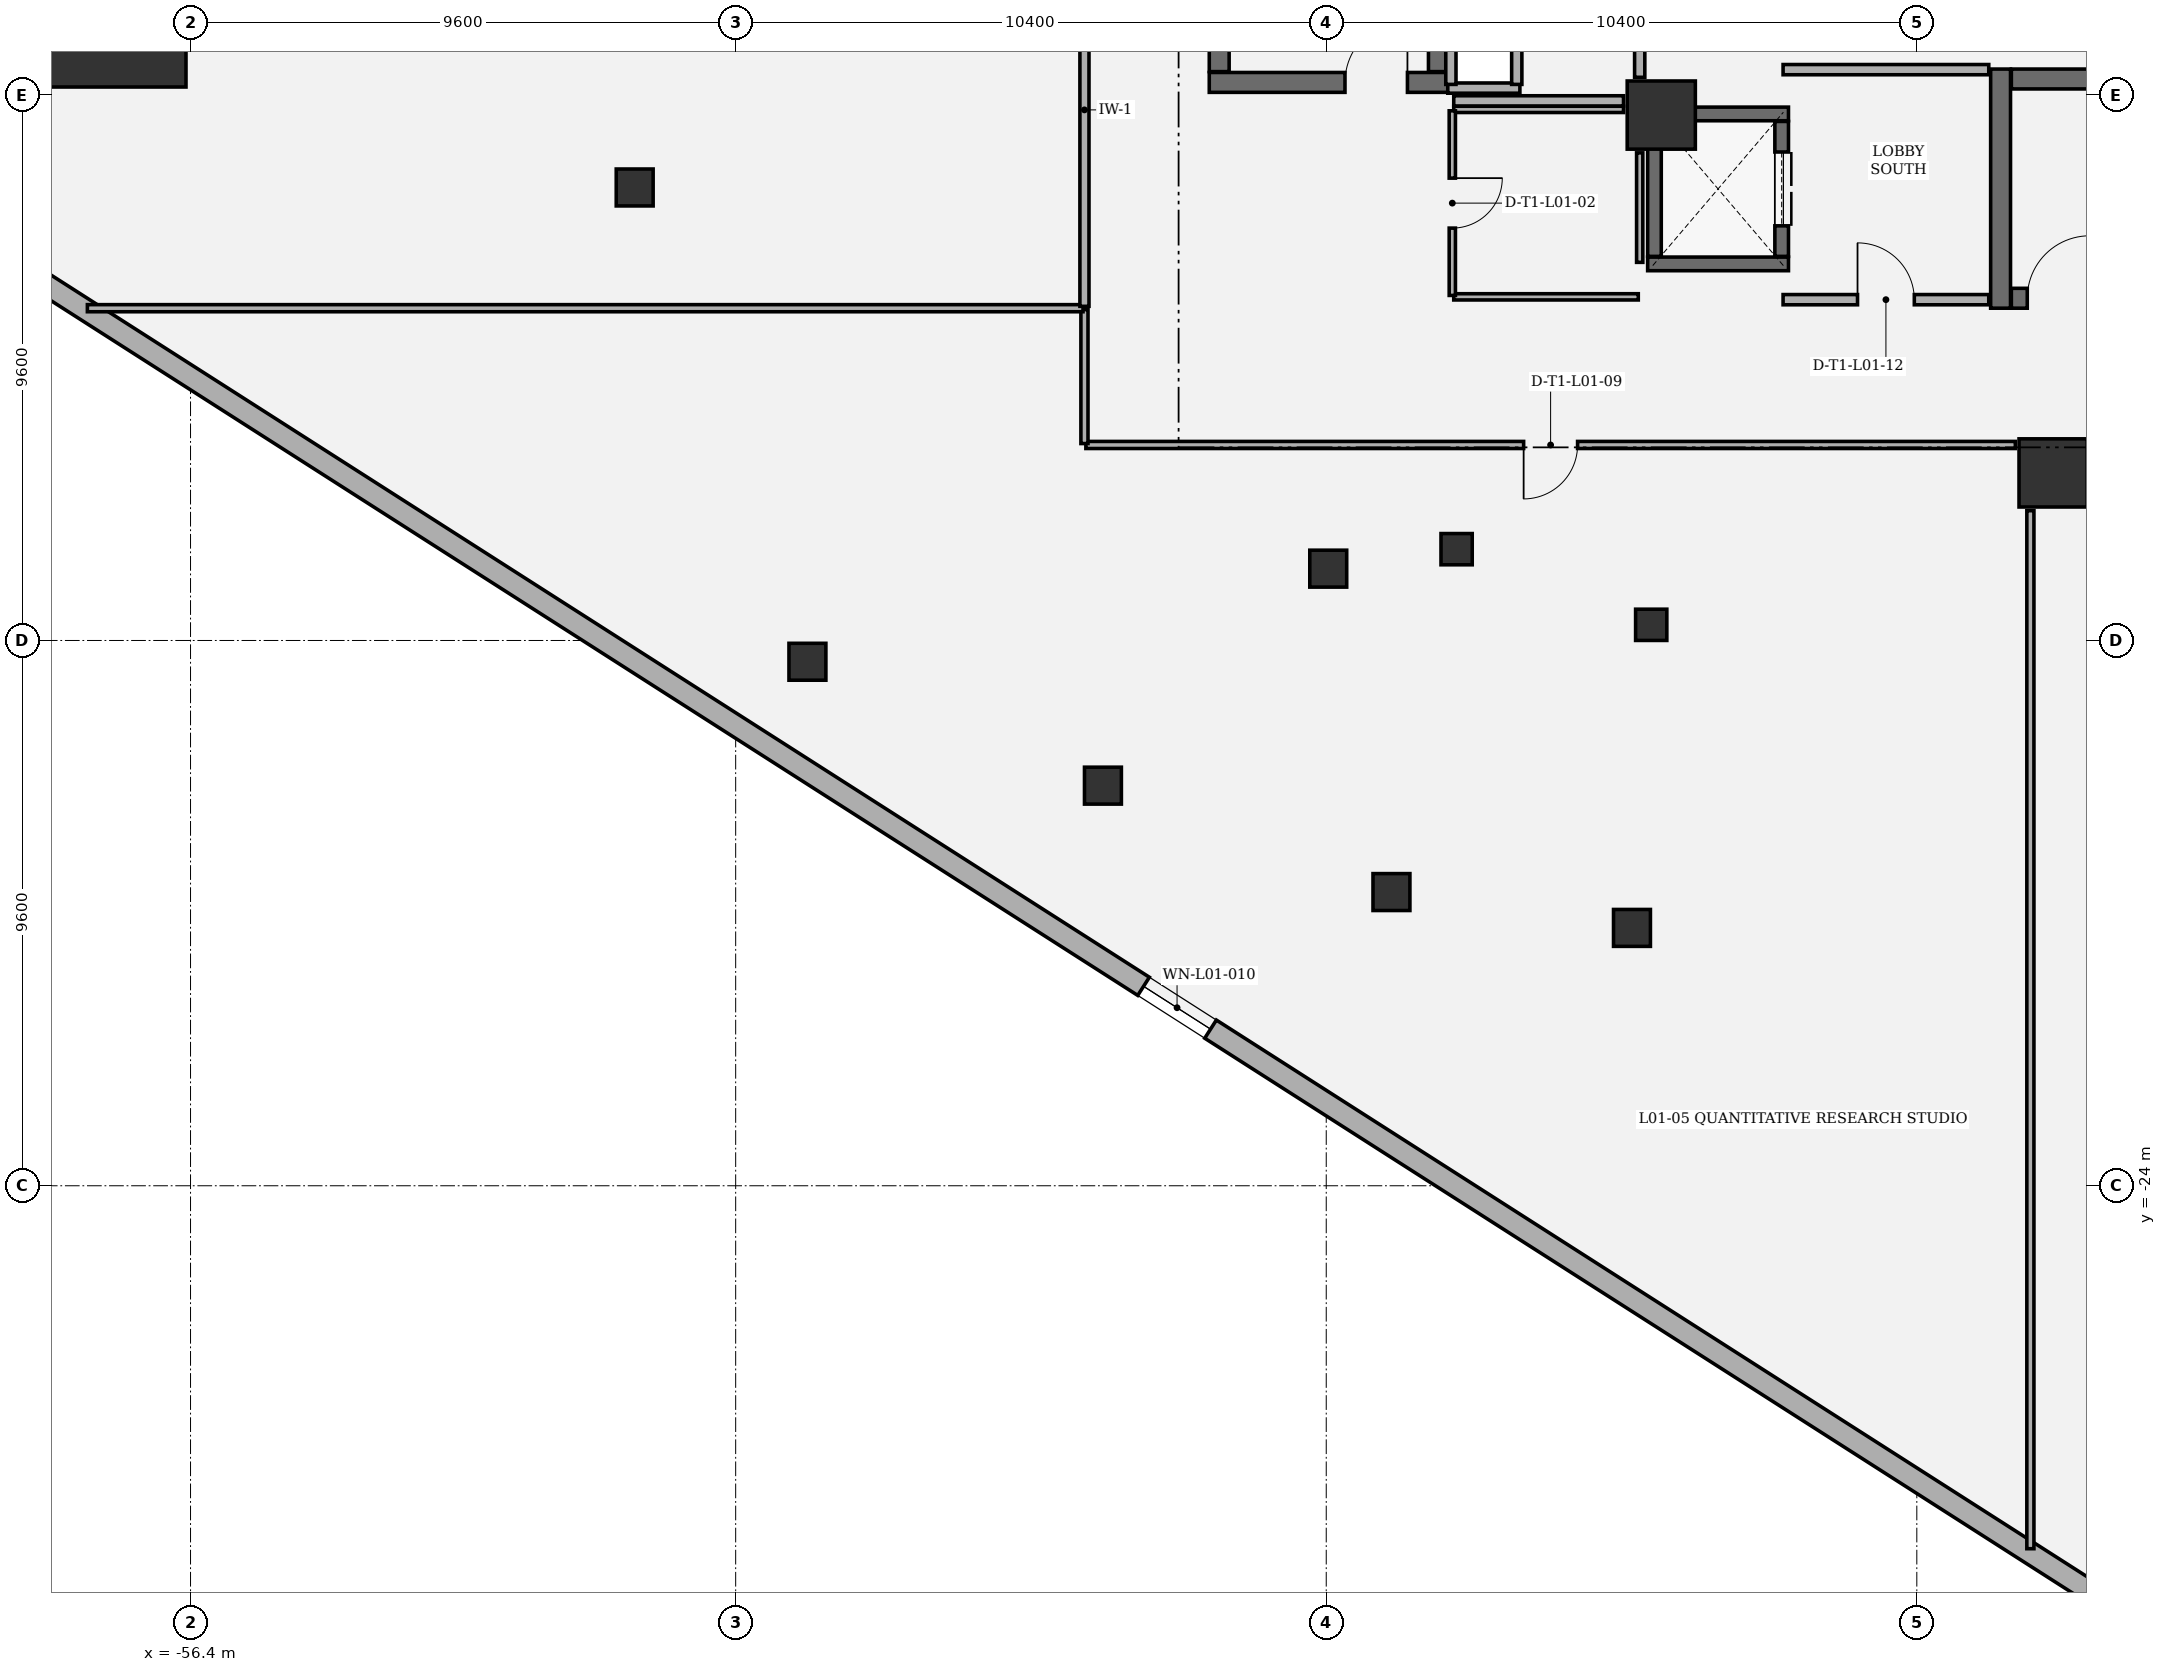
"""IFC4 building model, lengths in metres.
Left out: names, types, materials, properties, quantities, classifications, styles, units other than length and angle.
Written with IfcOpenShell. Run it as: python <this file> out.ifc"""

import sys

from ifc_helpers import new_model, si_unit, direction, frame, frame_2d, origin, origin_2d, place, context, subcontext, project, spatial, rectangle, extrude, element, fill, save


model = new_model("IFC4")
c1 = context("Model", 3, precision=1e-05, world=origin(), true_north=direction((0.0, 1.0)))
c2 = subcontext(c1, "Body", "Model", "MODEL_VIEW")
j1 = project(units=[si_unit("LENGTHUNIT", "METRE"), si_unit("PLANEANGLEUNIT", "RADIAN")], contexts=[c1])
p1 = place(None, origin())
s1 = spatial("IfcSite", under=j1, at=p1, CompositionType="ELEMENT")
p2 = place(p1, origin())
s2 = spatial("IfcBuilding", under=s1, at=p2, CompositionType="ELEMENT")
p3 = place(p2, frame((0.0, 0.0, 6.6)))
s3 = spatial("IfcBuildingStorey", under=s2, at=p3, CompositionType="ELEMENT", Elevation=6.6)
p4 = place(p3, frame((-57.68, -3.456, 0.0), z_axis=(0.0, 0.0, 1.0), x_axis=(1.0, 0.0, 0.0)))
e1 = element("IfcColumn", 1, at=p4, inside=s3, PredefinedType="COLUMN", context=c2, shape_type="SweptSolid", body=[
    extrude(rectangle(XDim=2.4, YDim=2.4, at=origin_2d()), origin(), (0.0, 0.0, 1.0), 5.4),
])
for number, where, z_axis, x_axis in (
    (2, (-23.6, -11.45, 0.0), (0.0, 0.0, 1.0), (1.0, 0.0, 0.0)),
    (3, (-30.5, -5.15, 0.0), (0.0, 0.0, 1.0), (1.0, 0.0, 0.0)),
):
    element("IfcColumn", number, at=place(p3, frame(where, z_axis=z_axis, x_axis=x_axis)), inside=s3, PredefinedType="COLUMN", context=c2, shape_type="SweptSolid", body=[
        extrude(rectangle(XDim=1.2, YDim=1.2, at=origin_2d()), origin(), (0.0, 0.0, 1.0), 5.4),
    ])
for number, where, z_axis, x_axis in (
    (4, (-45.536, -14.775, 0.0), (0.0, 0.0, 1.0), (1.0, 0.0, 0.0)),
    (5, (-40.333, -16.956, 0.0), (0.0, 0.0, 1.0), (1.0, 0.0, 0.0)),
    (6, (-35.252, -18.829, 0.0), (0.0, 0.0, 1.0), (1.0, 0.0, 0.0)),
    (7, (-31.016, -19.46, 0.0), (0.0, 0.0, 1.0), (1.0, 0.0, 0.0)),
    (8, (-48.578, -6.425, 0.0), (0.0, 0.0, 1.0), (1.0, 0.0, 0.0)),
    (9, (-36.365, -13.135, 0.0), (0.0, 0.0, 1.0), (1.0, 0.0, 0.0)),
):
    element("IfcColumn", number, at=place(p3, frame(where, z_axis=z_axis, x_axis=x_axis)), inside=s3, PredefinedType="COLUMN", context=c2, shape_type="SweptSolid", body=[
        extrude(rectangle(XDim=0.65, YDim=0.65, at=origin_2d()), origin(), (0.0, 0.0, 1.0), 5.4),
    ])
for number, where, z_axis, x_axis in (
    (10, (-34.104, -12.792, 0.0), (0.0, 0.0, 1.0), (1.0, 0.0, 0.0)),
    (11, (-30.677, -14.124, 0.0), (0.0, 0.0, 1.0), (1.0, 0.0, 0.0)),
):
    element("IfcColumn", number, at=place(p3, frame(where, z_axis=z_axis, x_axis=x_axis)), inside=s3, PredefinedType="COLUMN", context=c2, shape_type="SweptSolid", body=[
        extrude(rectangle(XDim=0.55, YDim=0.55, at=origin_2d()), origin(), (0.0, 0.0, 1.0), 5.4),
    ])
p5 = place(p3, frame((-13.635, -37.094, 0.0), z_axis=(0.0, 0.0, 1.0), x_axis=(-0.842602364841, 0.538536214905, 0.0)))
e12 = element("IfcWall", 12, at=p5, inside=s3, PredefinedType="SOLIDWALL", context=c2, shape_type="SweptSolid", body=[
    extrude(rectangle(XDim=60.27, YDim=0.38, at=frame_2d((30.135, 0.0))), origin(), (0.0, 0.0, 1.0), 5.14),
])
p6 = place(p5, frame((29.435, 0.0, 0.8)))
e13 = element("IfcOpeningElement", 13, at=p6, cuts=e12, PredefinedType="OPENING", context=c2, shape_type="SweptSolid", body=[
    extrude(rectangle(XDim=1.4, YDim=1.5, at=frame_2d((0.7, 0.75))), frame((0.0, 0.2, 0.0), z_axis=(0.0, -1.0, 0.0), x_axis=(1.0, 0.0, 0.0)), (0.0, 0.0, 1.0), 0.4),
])
p7 = place(p3, frame((-24.525, -4.34, 0.0), z_axis=(0.0, 0.0, 1.0), x_axis=(0.0, -1.0, 0.0)))
e14 = element("IfcWall", 14, at=p7, inside=s3, PredefinedType="SHEAR", context=c2, shape_type="SweptSolid", body=[
    extrude(rectangle(XDim=4.21, YDim=0.35, at=frame_2d((2.105, 0.0))), origin(), (0.0, 0.0, 1.0), 5.14),
])
p8 = place(p3, frame((-24.335, -8.375, 0.0), z_axis=(0.0, 0.0, 1.0), x_axis=(1.0, 0.0, 0.0)))
e15 = element("IfcWall", 15, at=p8, inside=s3, PredefinedType="SHEAR", context=c2, shape_type="SweptSolid", body=[
    extrude(rectangle(XDim=8.12, YDim=0.35, at=frame_2d((4.06, 0.0))), origin(), (0.0, 0.0, 1.0), 5.14),
])
p9 = place(p8, frame((0.28, 0.0, 0.0)))
e16 = element("IfcOpeningElement", 16, at=p9, cuts=e15, PredefinedType="OPENING", context=c2, shape_type="SweptSolid", body=[
    extrude(rectangle(XDim=1.1, YDim=2.2, at=frame_2d((0.55, 1.1))), frame((0.0, 0.185, 0.0), z_axis=(0.0, -1.0, 0.0), x_axis=(1.0, 0.0, 0.0)), (0.0, 0.0, 1.0), 0.37),
])
p10 = place(p3, frame((-16.215, -4.515, 0.0), z_axis=(0.0, 0.0, 1.0), x_axis=(-1.0, 0.0, 0.0)))
e17 = element("IfcWall", 17, at=p10, inside=s3, PredefinedType="SHEAR", context=c2, shape_type="SweptSolid", body=[
    extrude(rectangle(XDim=8.12, YDim=0.35, at=frame_2d((4.06, 0.0))), origin(), (0.0, 0.0, 1.0), 5.14),
])
p11 = place(p3, frame((-38.46, -4.575, 0.0), z_axis=(0.0, 0.0, 1.0), x_axis=(1.0, 0.0, 0.0)))
e18 = element("IfcWall", 18, at=p11, inside=s3, PredefinedType="SHEAR", context=c2, shape_type="SweptSolid", body=[
    extrude(rectangle(XDim=4.21, YDim=0.35, at=frame_2d((2.105, 0.0))), origin(), (0.0, 0.0, 1.0), 5.14),
])
p12 = place(p11, frame((2.39, 0.0, 0.0)))
e19 = element("IfcOpeningElement", 19, at=p12, cuts=e18, PredefinedType="OPENING", context=c2, shape_type="SweptSolid", body=[
    extrude(rectangle(XDim=1.1, YDim=2.2, at=frame_2d((0.55, 1.1))), frame((0.0, 0.185, 0.0), z_axis=(0.0, -1.0, 0.0), x_axis=(1.0, 0.0, 0.0)), (0.0, 0.0, 1.0), 0.37),
])
for number, where, z_axis, x_axis in (
    (20, (-34.425, -4.385, 0.0), (0.0, 0.0, 1.0), (0.0, 1.0, 0.0)),
    (21, (-38.285, 4.385, 0.0), (0.0, 0.0, 1.0), (0.0, -1.0, 0.0)),
):
    element("IfcWall", number, at=place(p3, frame(where, z_axis=z_axis, x_axis=x_axis)), inside=s3, PredefinedType="SHEAR", context=c2, shape_type="SweptSolid", body=[
        extrude(rectangle(XDim=8.77, YDim=0.35, at=frame_2d((4.385, 0.0))), origin(), (0.0, 0.0, 1.0), 5.14),
    ])
for number, where, z_axis, x_axis in (
    (22, (-28.26, -7.77, 0.0), (0.0, 0.0, 1.0), (-1.0, 0.0, 0.0)),
    (23, (-30.74, -5.13, 0.0), (0.0, 0.0, 1.0), (1.0, 0.0, 0.0)),
):
    element("IfcWall", number, at=place(p3, frame(where, z_axis=z_axis, x_axis=x_axis)), inside=s3, PredefinedType="SHEAR", context=c2, shape_type="SweptSolid", body=[
        extrude(rectangle(XDim=2.48, YDim=0.24, at=frame_2d((1.24, 0.0))), origin(), (0.0, 0.0, 1.0), 5.14),
    ])
p13 = place(p3, frame((-30.62, -7.638, 0.0), z_axis=(0.0, 0.0, 1.0), x_axis=(0.0, 1.0, 0.0)))
e24 = element("IfcWall", 24, at=p13, inside=s3, PredefinedType="SHEAR", context=c2, shape_type="SweptSolid", body=[
    extrude(rectangle(XDim=2.376, YDim=0.24, at=frame_2d((1.188, 0.0))), origin(), (0.0, 0.0, 1.0), 5.14),
])
p14 = place(p3, frame((-28.38, -5.262, 0.0), z_axis=(0.0, 0.0, 1.0), x_axis=(0.0, -1.0, 0.0)))
e25 = element("IfcWall", 25, at=p14, inside=s3, PredefinedType="SHEAR", context=c2, shape_type="SweptSolid", body=[
    extrude(rectangle(XDim=2.376, YDim=0.24, at=frame_2d((1.188, 0.0))), origin(), (0.0, 0.0, 1.0), 5.14),
])
p15 = place(p14, frame((0.538, 0.0, 0.0)))
e26 = element("IfcOpeningElement", 26, at=p15, cuts=e25, PredefinedType="OPENING", context=c2, shape_type="SweptSolid", body=[
    extrude(rectangle(XDim=1.3, YDim=2.3, at=frame_2d((0.65, 1.15))), frame((0.0, 0.13, 0.0), z_axis=(0.0, -1.0, 0.0), x_axis=(1.0, 0.0, 0.0)), (0.0, 0.0, 1.0), 0.26),
])
p16 = place(p3, frame((-32.99, -4.675, 0.0), z_axis=(0.0, 0.0, 1.0), x_axis=(-1.0, 0.0, 0.0)))
e27 = element("IfcWall", 27, at=p16, inside=s3, PredefinedType="PARTITIONING", context=c2, shape_type="SweptSolid", body=[
    extrude(rectangle(XDim=1.27, YDim=0.18, at=frame_2d((0.635, 0.0))), origin(), (0.0, 0.0, 1.0), 5.14),
])
for number, where, z_axis, x_axis in (
    (28, (-34.205, -4.61, 0.0), (0.0, 0.0, 1.0), (0.0, 1.0, 0.0)),
    (29, (-33.045, -3.66, 0.0), (0.0, 0.0, 1.0), (0.0, -1.0, 0.0)),
):
    element("IfcWall", number, at=place(p3, frame(where, z_axis=z_axis, x_axis=x_axis)), inside=s3, PredefinedType="PARTITIONING", context=c2, shape_type="SweptSolid", body=[
        extrude(rectangle(XDim=0.95, YDim=0.18, at=frame_2d((0.475, 0.0))), origin(), (0.0, 0.0, 1.0), 5.14),
    ])
p17 = place(p3, frame((-28.355, -8.4, 0.0), z_axis=(0.0, 0.0, 1.0), x_axis=(1.0, 0.0, 0.0)))
e30 = element("IfcWall", 30, at=p17, inside=s3, PredefinedType="PARTITIONING", context=c2, shape_type="SweptSolid", body=[
    extrude(rectangle(XDim=3.622, YDim=0.18, at=frame_2d((1.811, 0.0))), origin(), (0.0, 0.0, 1.0), 5.14),
])
p18 = place(p17, frame((1.311, 0.0, 0.0)))
e31 = element("IfcOpeningElement", 31, at=p18, cuts=e30, PredefinedType="OPENING", context=c2, shape_type="SweptSolid", body=[
    extrude(rectangle(XDim=1.0, YDim=2.15, at=frame_2d((0.5, 1.075))), frame((0.0, 0.1, 0.0), z_axis=(0.0, -1.0, 0.0), x_axis=(1.0, 0.0, 0.0)), (0.0, 0.0, 1.0), 0.2),
])
p19 = place(p3, frame((-24.733, -4.35, 0.0), z_axis=(0.0, 0.0, 1.0), x_axis=(-1.0, 0.0, 0.0)))
e32 = element("IfcWall", 32, at=p19, inside=s3, PredefinedType="PARTITIONING", context=c2, shape_type="SweptSolid", body=[
    extrude(rectangle(XDim=3.622, YDim=0.18, at=frame_2d((1.811, 0.0))), origin(), (0.0, 0.0, 1.0), 5.14),
])
p20 = place(p3, frame((-34.155, -8.35, 0.0), z_axis=(0.0, 0.0, 1.0), x_axis=(1.0, 0.0, 0.0)))
e33 = element("IfcWall", 33, at=p20, inside=s3, PredefinedType="PARTITIONING", context=c2, shape_type="SweptSolid", body=[
    extrude(rectangle(XDim=3.25, YDim=0.11, at=frame_2d((1.625, 0.0))), origin(), (0.0, 0.0, 1.0), 5.14),
])
p21 = place(p3, frame((-30.88, -7.743, 0.0), z_axis=(0.0, 0.0, 1.0), x_axis=(0.0, 1.0, 0.0)))
e34 = element("IfcWall", 34, at=p21, inside=s3, PredefinedType="PARTITIONING", context=c2, shape_type="SweptSolid", body=[
    extrude(rectangle(XDim=1.928, YDim=0.11, at=frame_2d((0.964, 0.0))), origin(), (0.0, 0.0, 1.0), 5.14),
])
p22 = place(p3, frame((-31.165, -5.05, 0.0), z_axis=(0.0, 0.0, 1.0), x_axis=(-1.0, 0.0, 0.0)))
e35 = element("IfcWall", 35, at=p22, inside=s3, PredefinedType="PARTITIONING", context=c2, shape_type="SweptSolid", body=[
    extrude(rectangle(XDim=2.99, YDim=0.11, at=frame_2d((1.495, 0.0))), origin(), (0.0, 0.0, 1.0), 5.14),
])
p23 = place(p3, frame((-34.18, -5.075, 0.0), z_axis=(0.0, 0.0, 1.0), x_axis=(0.0, -1.0, 0.0)))
e36 = element("IfcWall", 36, at=p23, inside=s3, PredefinedType="PARTITIONING", context=c2, shape_type="SweptSolid", body=[
    extrude(rectangle(XDim=3.25, YDim=0.11, at=frame_2d((1.625, 0.0))), origin(), (0.0, 0.0, 1.0), 5.14),
])
p24 = place(p23, frame((1.185, 0.0, 0.0)))
e37 = element("IfcOpeningElement", 37, at=p24, cuts=e36, PredefinedType="OPENING", context=c2, shape_type="SweptSolid", body=[
    extrude(rectangle(XDim=0.88, YDim=2.1, at=frame_2d((0.44, 1.05))), frame((0.0, 0.065, 0.0), z_axis=(0.0, -1.0, 0.0), x_axis=(1.0, 0.0, 0.0)), (0.0, 0.0, 1.0), 0.13),
])
p25 = place(p3, frame((-34.155, -4.9, 0.0), z_axis=(0.0, 0.0, 1.0), x_axis=(1.0, 0.0, 0.0)))
e38 = element("IfcWall", 38, at=p25, inside=s3, PredefinedType="PARTITIONING", context=c2, shape_type="SweptSolid", body=[
    extrude(rectangle(XDim=2.99, YDim=0.18, at=frame_2d((1.495, 0.0))), origin(), (0.0, 0.0, 1.0), 5.14),
])
p26 = place(p3, frame((-30.88, -4.485, 0.0), z_axis=(0.0, 0.0, 1.0), x_axis=(0.0, 1.0, 0.0)))
e39 = element("IfcWall", 39, at=p26, inside=s3, PredefinedType="PARTITIONING", context=c2, shape_type="SweptSolid", body=[
    extrude(rectangle(XDim=2.86, YDim=0.18, at=frame_2d((1.43, 0.0))), origin(), (0.0, 0.0, 1.0), 5.14),
])
p27 = place(p3, frame((-24.0, -12.115, 0.0), z_axis=(0.0, 0.0, 1.0), x_axis=(0.0, -1.0, 0.0)))
e40 = element("IfcWall", 40, at=p27, inside=s3, PredefinedType="PARTITIONING", context=c2, shape_type="SweptSolid", body=[
    extrude(rectangle(XDim=18.275, YDim=0.125, at=frame_2d((9.137, 0.0))), origin(), (0.0, 0.0, 1.0), 4.653),
])
p28 = place(p3, frame((-24.265, -10.958, 0.0), z_axis=(0.0, 0.0, 1.0), x_axis=(-1.0, 0.0, 0.0)))
e41 = element("IfcWall", 41, at=p28, inside=s3, PredefinedType="PARTITIONING", context=c2, shape_type="SweptSolid", body=[
    extrude(rectangle(XDim=16.368, YDim=0.125, at=frame_2d((8.184, 0.0))), origin(), (0.0, 0.0, 1.0), 4.653),
])
p29 = place(p28, frame((7.709, 0.0, 0.0)))
e42 = element("IfcOpeningElement", 42, at=p29, cuts=e41, PredefinedType="OPENING", context=c2, shape_type="SweptSolid", body=[
    extrude(rectangle(XDim=0.95, YDim=2.15, at=frame_2d((0.475, 1.075))), frame((0.0, 0.073, 0.0), z_axis=(0.0, -1.0, 0.0), x_axis=(1.0, 0.0, 0.0)), (0.0, 0.0, 1.0), 0.145),
])
p30 = place(p3, frame((-40.658, -8.575, 0.0), z_axis=(0.0, 0.0, 1.0), x_axis=(0.0, -1.0, 0.0)))
e43 = element("IfcWall", 43, at=p30, inside=s3, PredefinedType="PARTITIONING", context=c2, shape_type="SweptSolid", body=[
    extrude(rectangle(XDim=2.358, YDim=0.125, at=frame_2d((1.179, 0.0))), origin(), (0.0, 0.0, 1.0), 5.14),
])
p31 = place(p3, frame((-40.683, -8.55, 0.0), z_axis=(0.0, 0.0, 1.0), x_axis=(-1.0, 0.0, 0.0)))
e44 = element("IfcWall", 44, at=p31, inside=s3, PredefinedType="PARTITIONING", context=c2, shape_type="SweptSolid", body=[
    extrude(rectangle(XDim=17.533, YDim=0.125, at=frame_2d((8.767, 0.0))), origin(), (0.0, 0.0, 1.0), 4.11),
])
p32 = place(p3, frame((-40.658, -8.517, 0.0), z_axis=(0.0, 0.0, 1.0), x_axis=(0.0, 1.0, 0.0)))
e45 = element("IfcWall", 45, at=p32, inside=s3, PredefinedType="PARTITIONING", context=c2, shape_type="SweptSolid", body=[
    extrude(rectangle(XDim=16.804, YDim=0.16, at=frame_2d((8.402, 0.0))), origin(), (0.0, 0.0, 1.0), 5.14),
])
p33 = place(p32, frame((7.852, 0.0, 0.0)))
e46 = element("IfcOpeningElement", 46, at=p33, cuts=e45, PredefinedType="OPENING", context=c2, shape_type="SweptSolid", body=[
    extrude(rectangle(XDim=1.1, YDim=2.15, at=frame_2d((0.55, 1.075))), frame((0.0, 0.09, 0.0), z_axis=(0.0, -1.0, 0.0), x_axis=(1.0, 0.0, 0.0)), (0.0, 0.0, 1.0), 0.18),
])
p34 = place(p6, origin())
e47 = element("IfcWindow", 47, at=p34, inside=s3, PartitioningType="SINGLE_PANEL", PredefinedType="WINDOW", context=c2, shape_type="SweptSolid", body=[
    extrude(rectangle(XDim=1.4, YDim=1.5, at=frame_2d((0.7, 0.75))), frame((0.0, 0.03, 0.0), z_axis=(0.0, -1.0, 0.0), x_axis=(1.0, 0.0, 0.0)), (0.0, 0.0, 1.0), 0.06),
])
fill(e13, e47)
p35 = place(p9, origin())
e48 = element("IfcDoor", 48, at=p35, inside=s3, OperationType="SINGLE_SWING_RIGHT", PredefinedType="DOOR", context=c2, shape_type="SweptSolid", body=[
    extrude(rectangle(XDim=1.1, YDim=2.2, at=frame_2d((0.55, 1.1))), frame((0.0, 0.025, 0.0), z_axis=(0.0, -1.0, 0.0), x_axis=(1.0, 0.0, 0.0)), (0.0, 0.0, 1.0), 0.05),
])
fill(e16, e48)
p36 = place(p12, origin())
e49 = element("IfcDoor", 49, at=p36, inside=s3, OperationType="SINGLE_SWING_RIGHT", PredefinedType="DOOR", context=c2, shape_type="SweptSolid", body=[
    extrude(rectangle(XDim=1.1, YDim=2.2, at=frame_2d((0.55, 1.1))), frame((0.0, 0.025, 0.0), z_axis=(0.0, -1.0, 0.0), x_axis=(1.0, 0.0, 0.0)), (0.0, 0.0, 1.0), 0.05),
])
fill(e19, e49)
p37 = place(p15, origin())
e50 = element("IfcDoor", 50, at=p37, inside=s3, OperationType="DOUBLE_DOOR_SLIDING", PredefinedType="DOOR", context=c2, shape_type="SweptSolid", body=[
    extrude(rectangle(XDim=1.3, YDim=2.3, at=frame_2d((0.65, 1.15))), frame((0.0, 0.025, 0.0), z_axis=(0.0, -1.0, 0.0), x_axis=(1.0, 0.0, 0.0)), (0.0, 0.0, 1.0), 0.05),
])
fill(e26, e50)
p38 = place(p24, origin())
e51 = element("IfcDoor", 51, at=p38, inside=s3, OperationType="SINGLE_SWING_LEFT", PredefinedType="DOOR", context=c2, shape_type="SweptSolid", body=[
    extrude(rectangle(XDim=0.88, YDim=2.1, at=frame_2d((0.44, 1.05))), frame((0.0, 0.025, 0.0), z_axis=(0.0, -1.0, 0.0), x_axis=(1.0, 0.0, 0.0)), (0.0, 0.0, 1.0), 0.05),
])
fill(e37, e51)
p39 = place(p29, origin())
e52 = element("IfcDoor", 52, at=p39, inside=s3, OperationType="SINGLE_SWING_RIGHT", PredefinedType="DOOR", context=c2, shape_type="SweptSolid", body=[
    extrude(rectangle(XDim=0.95, YDim=2.15, at=frame_2d((0.475, 1.075))), frame((0.0, 0.025, 0.0), z_axis=(0.0, -1.0, 0.0), x_axis=(1.0, 0.0, 0.0)), (0.0, 0.0, 1.0), 0.05),
])
fill(e42, e52)
p40 = place(p18, origin())
e53 = element("IfcDoor", 53, at=p40, inside=s3, OperationType="SINGLE_SWING_LEFT", PredefinedType="DOOR", context=c2, shape_type="SweptSolid", body=[
    extrude(rectangle(XDim=1.0, YDim=2.15, at=frame_2d((0.5, 1.075))), frame((0.0, 0.025, 0.0), z_axis=(0.0, -1.0, 0.0), x_axis=(1.0, 0.0, 0.0)), (0.0, 0.0, 1.0), 0.05),
])
fill(e31, e53)
save(model, sys.argv[1])
